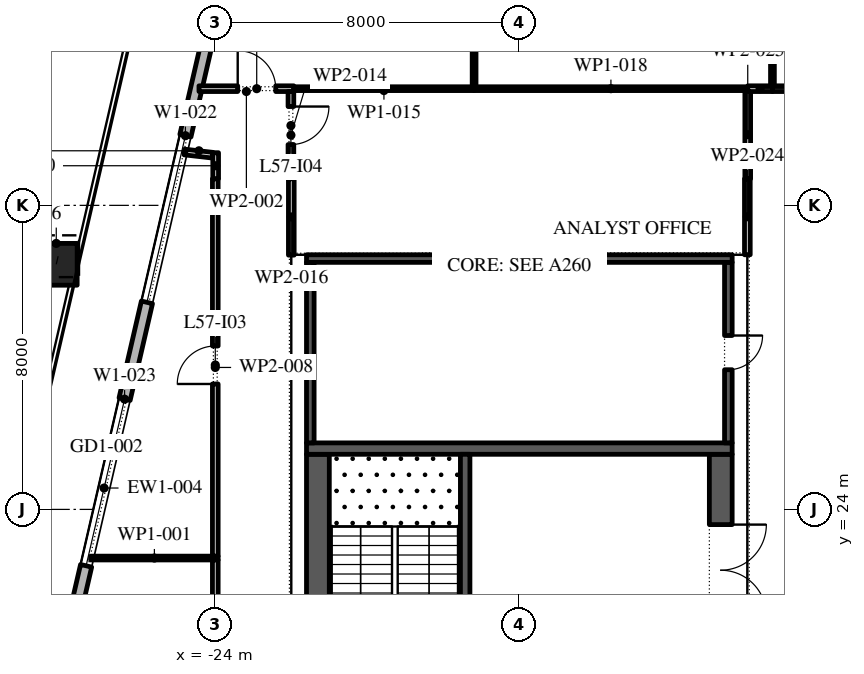
"""IFC4 building model, lengths in metres.
Left out: names, types, materials, properties, quantities, classifications, styles, units other than length and angle.
Written with IfcOpenShell. Run it as: python <this file> out.ifc"""

import sys

from ifc_helpers import new_model, si_unit, direction, frame, frame_2d, origin, origin_2d, place, context, subcontext, project, spatial, rectangle, extrude, element, fill, save


model = new_model("IFC4")
c1 = context("Model", 3, precision=1e-05, world=origin(), true_north=direction((0.0, 1.0)))
c2 = subcontext(c1, "Body", "Model", "MODEL_VIEW")
j1 = project(units=[si_unit("LENGTHUNIT", "METRE"), si_unit("PLANEANGLEUNIT", "RADIAN")], contexts=[c1])
p1 = place(None, origin())
s1 = spatial("IfcSite", under=j1, at=p1, CompositionType="ELEMENT")
p2 = place(p1, origin())
s2 = spatial("IfcBuilding", under=s1, at=p2, CompositionType="ELEMENT")
p3 = place(p2, frame((0.0, 0.0, 264.0)))
s3 = spatial("IfcBuildingStorey", under=s2, at=p3, CompositionType="ELEMENT", Elevation=264.0)
p4 = place(p3, frame((-28.184, 30.449, 0.0), z_axis=(0.011610223917, 0.050562525159, 0.998653410223), x_axis=(-0.974635787342, 0.223796966095, 0.0)))
e1 = element("IfcColumn", 1, at=p4, inside=s3, PredefinedType="COLUMN", context=c2, shape_type="SweptSolid", body=[
    extrude(rectangle(XDim=1.1, YDim=1.1, at=origin_2d()), origin(), (0.0, 0.0, 1.0), 4.206),
])
p5 = place(p3, frame((-21.359, 48.678, 0.0), z_axis=(0.0, 0.0, 1.0), x_axis=(-0.224949198343, -0.974370493275, 0.0)))
e2 = element("IfcWall", 2, at=p5, inside=s3, PredefinedType="STANDARD", context=c2, shape_type="SweptSolid", body=[
    extrude(rectangle(XDim=49.5, YDim=0.3, at=frame_2d((24.75, 0.0))), origin(), (0.0, 0.0, 1.0), 4.0),
])
p6 = place(p5, frame((1.157, 0.0, 0.45)))
e3 = element("IfcOpeningElement", 3, at=p6, cuts=e2, PredefinedType="OPENING", context=c2, shape_type="SweptSolid", body=[
    extrude(rectangle(XDim=4.5, YDim=3.05, at=frame_2d((2.25, 1.525))), frame((0.0, 0.16, 0.0), z_axis=(0.0, -1.0, 0.0), x_axis=(1.0, 0.0, 0.0)), (0.0, 0.0, 1.0), 0.32),
])
p7 = place(p5, frame((9.171, 0.0, 0.0)))
e4 = element("IfcOpeningElement", 4, at=p7, cuts=e2, PredefinedType="OPENING", context=c2, shape_type="SweptSolid", body=[
    extrude(rectangle(XDim=2.4, YDim=3.5, at=frame_2d((1.2, 1.75))), frame((0.0, 0.16, 0.0), z_axis=(0.0, -1.0, 0.0), x_axis=(1.0, 0.0, 0.0)), (0.0, 0.0, 1.0), 0.32),
])
p8 = place(p5, frame((15.236, 0.0, 0.45)))
e5 = element("IfcOpeningElement", 5, at=p8, cuts=e2, PredefinedType="OPENING", context=c2, shape_type="SweptSolid", body=[
    extrude(rectangle(XDim=4.5, YDim=3.05, at=frame_2d((2.25, 1.525))), frame((0.0, 0.16, 0.0), z_axis=(0.0, -1.0, 0.0), x_axis=(1.0, 0.0, 0.0)), (0.0, 0.0, 1.0), 0.32),
])
p9 = place(p5, frame((22.35, 0.0, 0.45)))
e6 = element("IfcOpeningElement", 6, at=p9, cuts=e2, PredefinedType="OPENING", context=c2, shape_type="SweptSolid", body=[
    extrude(rectangle(XDim=4.5, YDim=3.05, at=frame_2d((2.25, 1.525))), frame((0.0, 0.16, 0.0), z_axis=(0.0, -1.0, 0.0), x_axis=(1.0, 0.0, 0.0)), (0.0, 0.0, 1.0), 0.32),
])
p10 = place(p5, frame((29.464, 0.0, 0.45)))
e7 = element("IfcOpeningElement", 7, at=p10, cuts=e2, PredefinedType="OPENING", context=c2, shape_type="SweptSolid", body=[
    extrude(rectangle(XDim=4.5, YDim=3.05, at=frame_2d((2.25, 1.525))), frame((0.0, 0.16, 0.0), z_axis=(0.0, -1.0, 0.0), x_axis=(1.0, 0.0, 0.0)), (0.0, 0.0, 1.0), 0.32),
])
p11 = place(p5, frame((37.628, 0.0, 0.0)))
e8 = element("IfcOpeningElement", 8, at=p11, cuts=e2, PredefinedType="OPENING", context=c2, shape_type="SweptSolid", body=[
    extrude(rectangle(XDim=2.4, YDim=3.325, at=frame_2d((1.2, 1.663))), frame((0.0, 0.16, 0.0), z_axis=(0.0, -1.0, 0.0), x_axis=(1.0, 0.0, 0.0)), (0.0, 0.0, 1.0), 0.32),
])
p12 = place(p5, frame((43.693, 0.0, 0.45)))
e9 = element("IfcOpeningElement", 9, at=p12, cuts=e2, PredefinedType="OPENING", context=c2, shape_type="SweptSolid", body=[
    extrude(rectangle(XDim=4.5, YDim=2.825, at=frame_2d((2.25, 1.413))), frame((0.0, 0.16, 0.0), z_axis=(0.0, -1.0, 0.0), x_axis=(1.0, 0.0, 0.0)), (0.0, 0.0, 1.0), 0.32),
])
p13 = place(p3, frame((-21.3, -2.45, 0.0), z_axis=(0.0, 0.0, 1.0), x_axis=(0.0, 1.0, 0.0)))
e10 = element("IfcWall", 10, at=p13, inside=s3, PredefinedType="SHEAR", context=c2, shape_type="SweptSolid", body=[
    extrude(rectangle(XDim=27.9, YDim=0.6, at=frame_2d((13.95, 0.0))), origin(), (0.0, 0.0, 1.0), 4.0),
])
p14 = place(p13, frame((5.05, 0.0, 0.0)))
e11 = element("IfcOpeningElement", 11, at=p14, cuts=e10, PredefinedType="OPENING", context=c2, shape_type="SweptSolid", body=[
    extrude(rectangle(XDim=1.2, YDim=2.1, at=frame_2d((0.6, 1.05))), frame((0.0, 0.31, 0.0), z_axis=(0.0, -1.0, 0.0), x_axis=(1.0, 0.0, 0.0)), (0.0, 0.0, 1.0), 0.62),
])
p15 = place(p13, frame((21.65, 0.0, 0.0)))
e12 = element("IfcOpeningElement", 12, at=p15, cuts=e10, PredefinedType="OPENING", context=c2, shape_type="SweptSolid", body=[
    extrude(rectangle(XDim=1.2, YDim=2.1, at=frame_2d((0.6, 1.05))), frame((0.0, 0.31, 0.0), z_axis=(0.0, -1.0, 0.0), x_axis=(1.0, 0.0, 0.0)), (0.0, 0.0, 1.0), 0.62),
])
p16 = place(p3, frame((-10.7, -2.45, 0.0), z_axis=(0.0, 0.0, 1.0), x_axis=(0.0, 1.0, 0.0)))
e13 = element("IfcWall", 13, at=p16, inside=s3, PredefinedType="SHEAR", context=c2, shape_type="SweptSolid", body=[
    extrude(rectangle(XDim=27.9, YDim=0.6, at=frame_2d((13.95, 0.0))), origin(), (0.0, 0.0, 1.0), 4.0),
])
p17 = place(p16, frame((23.65, 0.0, 0.0)))
e14 = element("IfcOpeningElement", 14, at=p17, cuts=e13, PredefinedType="OPENING", context=c2, shape_type="SweptSolid", body=[
    extrude(rectangle(XDim=2.4, YDim=2.1, at=frame_2d((1.2, 1.05))), frame((0.0, 0.31, 0.0), z_axis=(0.0, -1.0, 0.0), x_axis=(1.0, 0.0, 0.0)), (0.0, 0.0, 1.0), 0.62),
])
p18 = place(p16, frame((0.788, 0.0, 0.0)))
e15 = element("IfcOpeningElement", 15, at=p18, cuts=e13, PredefinedType="OPENING", context=c2, shape_type="SweptSolid", body=[
    extrude(rectangle(XDim=0.9, YDim=2.1, at=frame_2d((0.45, 1.05))), frame((0.0, 0.31, 0.0), z_axis=(0.0, -1.0, 0.0), x_axis=(1.0, 0.0, 0.0)), (0.0, 0.0, 1.0), 0.62),
])
p19 = place(p16, frame((3.962, 0.0, 0.0)))
e16 = element("IfcOpeningElement", 16, at=p19, cuts=e13, PredefinedType="OPENING", context=c2, shape_type="SweptSolid", body=[
    extrude(rectangle(XDim=1.0, YDim=2.1, at=frame_2d((0.5, 1.05))), frame((0.0, 0.31, 0.0), z_axis=(0.0, -1.0, 0.0), x_axis=(1.0, 0.0, 0.0)), (0.0, 0.0, 1.0), 0.62),
])
p20 = place(p3, frame((-21.6, 25.6, 0.0), z_axis=(0.0, 0.0, 1.0), x_axis=(1.0, 0.0, 0.0)))
e17 = element("IfcWall", 17, at=p20, inside=s3, PredefinedType="SHEAR", context=c2, shape_type="SweptSolid", body=[
    extrude(rectangle(XDim=11.2, YDim=0.3, at=frame_2d((5.6, 0.0))), origin(), (0.0, 0.0, 1.0), 4.0),
])
p21 = place(p3, frame((-17.425, 19.15, 0.0), z_axis=(0.0, 0.0, 1.0), x_axis=(0.0, 1.0, 0.0)))
e18 = element("IfcWall", 18, at=p21, inside=s3, PredefinedType="SHEAR", context=c2, shape_type="SweptSolid", body=[
    extrude(rectangle(XDim=6.3, YDim=0.25, at=frame_2d((3.15, 0.0))), origin(), (0.0, 0.0, 1.0), 4.0),
])
p22 = place(p21, frame((0.05, 0.0, 0.0)))
e19 = element("IfcOpeningElement", 19, at=p22, cuts=e18, PredefinedType="OPENING", context=c2, shape_type="SweptSolid", body=[
    extrude(rectangle(XDim=1.2, YDim=2.1, at=frame_2d((0.6, 1.05))), frame((0.0, 0.135, 0.0), z_axis=(0.0, -1.0, 0.0), x_axis=(1.0, 0.0, 0.0)), (0.0, 0.0, 1.0), 0.27),
])
p23 = place(p3, frame((-21.5, 25.75, 0.0), z_axis=(0.0, 0.0, 1.0), x_axis=(0.0, 1.0, 0.0)))
e20 = element("IfcWall", 20, at=p23, inside=s3, PredefinedType="SHEAR", context=c2, shape_type="SweptSolid", body=[
    extrude(rectangle(XDim=4.75, YDim=0.2, at=frame_2d((2.375, 0.0))), origin(), (0.0, 0.0, 1.0), 4.0),
])
p24 = place(p3, frame((-10.5, 25.75, 0.0), z_axis=(0.0, 0.0, 1.0), x_axis=(0.0, 1.0, 0.0)))
e21 = element("IfcWall", 21, at=p24, inside=s3, PredefinedType="SHEAR", context=c2, shape_type="SweptSolid", body=[
    extrude(rectangle(XDim=4.75, YDim=0.2, at=frame_2d((2.375, 0.0))), origin(), (0.0, 0.0, 1.0), 4.0),
])
p25 = place(p24, frame((1.925, 0.0, 0.0)))
e22 = element("IfcOpeningElement", 22, at=p25, cuts=e21, PredefinedType="OPENING", context=c2, shape_type="SweptSolid", body=[
    extrude(rectangle(XDim=0.9, YDim=2.1, at=frame_2d((0.45, 1.05))), frame((0.0, 0.11, 0.0), z_axis=(0.0, -1.0, 0.0), x_axis=(1.0, 0.0, 0.0)), (0.0, 0.0, 1.0), 0.22),
])
p26 = place(p3, frame((-21.6, 30.6, 0.0), z_axis=(0.0, 0.0, 1.0), x_axis=(1.0, 0.0, 0.0)))
e23 = element("IfcWall", 23, at=p26, inside=s3, PredefinedType="SHEAR", context=c2, shape_type="SweptSolid", body=[
    extrude(rectangle(XDim=11.2, YDim=0.2, at=frame_2d((5.6, 0.0))), origin(), (0.0, 0.0, 1.0), 4.0),
])
p27 = place(p3, frame((-27.28, 22.72, 0.0), z_axis=(0.0, 0.0, 1.0), x_axis=(1.0, 0.0, 0.0)))
e24 = element("IfcWall", 24, at=p27, inside=s3, PredefinedType="PARTITIONING", context=c2, shape_type="SweptSolid", body=[
    extrude(rectangle(XDim=3.355, YDim=0.1, at=frame_2d((1.677, 0.0))), origin(), (0.0, 0.0, 1.0), 4.0),
])
p28 = place(p3, frame((-24.429, 35.07, 0.0), z_axis=(0.0, 0.0, 1.0), x_axis=(1.0, 0.0, 0.0)))
e25 = element("IfcWall", 25, at=p28, inside=s3, PredefinedType="PARTITIONING", context=c2, shape_type="SweptSolid", body=[
    extrude(rectangle(XDim=2.494, YDim=0.15, at=frame_2d((1.247, 0.0))), origin(), (0.0, 0.0, 1.0), 4.0),
])
p29 = place(p28, frame((1.019, 0.0, 0.0)))
e26 = element("IfcOpeningElement", 26, at=p29, cuts=e25, PredefinedType="OPENING", context=c2, shape_type="SweptSolid", body=[
    extrude(rectangle(XDim=1.0, YDim=2.1, at=frame_2d((0.5, 1.05))), frame((0.0, 0.085, 0.0), z_axis=(0.0, -1.0, 0.0), x_axis=(1.0, 0.0, 0.0)), (0.0, 0.0, 1.0), 0.17),
])
p30 = place(p3, frame((-24.0, 8.86, 0.0), z_axis=(0.0, 0.0, 1.0), x_axis=(0.0, 1.0, 0.0)))
e27 = element("IfcWall", 27, at=p30, inside=s3, PredefinedType="PARTITIONING", context=c2, shape_type="SweptSolid", body=[
    extrude(rectangle(XDim=13.81, YDim=0.15, at=frame_2d((6.905, 0.0))), origin(), (0.0, 0.0, 1.0), 4.0),
])
p31 = place(p30, frame((4.96, 0.0, 0.0)))
e28 = element("IfcOpeningElement", 28, at=p31, cuts=e27, PredefinedType="OPENING", context=c2, shape_type="SweptSolid", body=[
    extrude(rectangle(XDim=1.0, YDim=2.1, at=frame_2d((0.5, 1.05))), frame((0.0, 0.085, 0.0), z_axis=(0.0, -1.0, 0.0), x_axis=(1.0, 0.0, 0.0)), (0.0, 0.0, 1.0), 0.17),
])
p32 = place(p3, frame((-24.0, 22.77, 0.0), z_axis=(0.0, 0.0, 1.0), x_axis=(0.0, 1.0, 0.0)))
e29 = element("IfcWall", 29, at=p32, inside=s3, PredefinedType="PARTITIONING", context=c2, shape_type="SweptSolid", body=[
    extrude(rectangle(XDim=9.93, YDim=0.15, at=frame_2d((4.965, 0.0))), origin(), (0.0, 0.0, 1.0), 4.0),
])
p33 = place(p32, frame((4.53, 0.0, 0.0)))
e30 = element("IfcOpeningElement", 30, at=p33, cuts=e29, PredefinedType="OPENING", context=c2, shape_type="SweptSolid", body=[
    extrude(rectangle(XDim=1.0, YDim=2.1, at=frame_2d((0.5, 1.05))), frame((0.0, 0.085, 0.0), z_axis=(0.0, -1.0, 0.0), x_axis=(1.0, 0.0, 0.0)), (0.0, 0.0, 1.0), 0.17),
])
p34 = place(p3, frame((-23.99, 32.7, 0.0), z_axis=(0.0, 0.0, 1.0), x_axis=(0.0, 1.0, 0.0)))
e31 = element("IfcWall", 31, at=p34, inside=s3, PredefinedType="PARTITIONING", context=c2, shape_type="SweptSolid", body=[
    extrude(rectangle(XDim=0.685, YDim=0.15, at=frame_2d((0.343, 0.0))), origin(), (0.0, 0.0, 1.0), 4.0),
])
p35 = place(p3, frame((-24.065, 33.319, 0.0), z_axis=(0.0, 0.0, 1.0), x_axis=(-0.993611867789, 0.112851478456, 0.0)))
e32 = element("IfcWall", 32, at=p35, inside=s3, PredefinedType="PARTITIONING", context=c2, shape_type="SweptSolid", body=[
    extrude(rectangle(XDim=0.753, YDim=0.15, at=frame_2d((0.376, 0.0))), origin(), (0.0, 0.0, 1.0), 4.0),
])
p36 = place(p3, frame((-22.01, 34.995, 0.0), z_axis=(0.0, 0.0, 1.0), x_axis=(0.0, -1.0, 0.0)))
e33 = element("IfcWall", 33, at=p36, inside=s3, PredefinedType="PARTITIONING", context=c2, shape_type="SweptSolid", body=[
    extrude(rectangle(XDim=2.295, YDim=0.15, at=frame_2d((1.147, 0.0))), origin(), (0.0, 0.0, 1.0), 4.0),
])
p37 = place(p36, frame((0.395, 0.0, 0.0)))
e34 = element("IfcOpeningElement", 34, at=p37, cuts=e33, PredefinedType="OPENING", context=c2, shape_type="SweptSolid", body=[
    extrude(rectangle(XDim=1.0, YDim=2.1, at=frame_2d((0.5, 1.05))), frame((0.0, 0.085, 0.0), z_axis=(0.0, -1.0, 0.0), x_axis=(1.0, 0.0, 0.0)), (0.0, 0.0, 1.0), 0.17),
])
p38 = place(p3, frame((-21.935, 35.07, 0.0), z_axis=(0.0, 0.0, 1.0), x_axis=(1.0, 0.0, 0.0)))
e35 = element("IfcWall", 35, at=p38, inside=s3, PredefinedType="PARTITIONING", context=c2, shape_type="SweptSolid", body=[
    extrude(rectangle(XDim=4.745, YDim=0.1, at=frame_2d((2.373, 0.0))), origin(), (0.0, 0.0, 1.0), 4.0),
])
p39 = place(p3, frame((-22.0, 32.7, 0.0), z_axis=(0.0, 0.0, 1.0), x_axis=(0.0, -1.0, 0.0)))
e36 = element("IfcWall", 36, at=p39, inside=s3, PredefinedType="PARTITIONING", context=c2, shape_type="SweptSolid", body=[
    extrude(rectangle(XDim=2.01, YDim=0.15, at=frame_2d((1.005, 0.0))), origin(), (0.0, 0.0, 1.0), 4.0),
])
p40 = place(p3, frame((-17.19, 35.12, 0.0), z_axis=(0.0, 0.0, 1.0), x_axis=(0.0, 1.0, 0.0)))
e37 = element("IfcWall", 37, at=p40, inside=s3, PredefinedType="PARTITIONING", context=c2, shape_type="SweptSolid", body=[
    extrude(rectangle(XDim=6.83, YDim=0.1, at=frame_2d((3.415, 0.0))), origin(), (0.0, 0.0, 1.0), 4.0),
])
p41 = place(p3, frame((-17.19, 35.07, 0.0), z_axis=(0.0, 0.0, 1.0), x_axis=(1.0, 0.0, 0.0)))
e38 = element("IfcWall", 38, at=p41, inside=s3, PredefinedType="PARTITIONING", context=c2, shape_type="SweptSolid", body=[
    extrude(rectangle(XDim=7.2, YDim=0.1, at=frame_2d((3.6, 0.0))), origin(), (0.0, 0.0, 1.0), 4.0),
])
p42 = place(p3, frame((-10.0, 30.7, 0.0), z_axis=(0.0, 0.0, 1.0), x_axis=(0.0, 1.0, 0.0)))
e39 = element("IfcWall", 39, at=p42, inside=s3, PredefinedType="PARTITIONING", context=c2, shape_type="SweptSolid", body=[
    extrude(rectangle(XDim=2.0, YDim=0.15, at=frame_2d((1.0, 0.0))), origin(), (0.0, 0.0, 1.0), 4.0),
])
p43 = place(p3, frame((-9.99, 32.7, 0.0), z_axis=(0.0, 0.0, 1.0), x_axis=(0.0, 1.0, 0.0)))
e40 = element("IfcWall", 40, at=p43, inside=s3, PredefinedType="PARTITIONING", context=c2, shape_type="SweptSolid", body=[
    extrude(rectangle(XDim=2.32, YDim=0.15, at=frame_2d((1.16, 0.0))), origin(), (0.0, 0.0, 1.0), 4.0),
])
p44 = place(p3, frame((-9.99, 35.07, 0.0), z_axis=(0.0, 0.0, 1.0), x_axis=(1.0, 0.0, 0.0)))
e41 = element("IfcWall", 41, at=p44, inside=s3, PredefinedType="PARTITIONING", context=c2, shape_type="SweptSolid", body=[
    extrude(rectangle(XDim=0.65, YDim=0.15, at=frame_2d((0.325, 0.0))), origin(), (0.0, 0.0, 1.0), 4.0),
])
p45 = place(p3, frame((-9.34, 35.145, 0.0), z_axis=(0.0, 0.0, 1.0), x_axis=(0.0, 1.0, 0.0)))
e42 = element("IfcWall", 42, at=p45, inside=s3, PredefinedType="PARTITIONING", context=c2, shape_type="SweptSolid", body=[
    extrude(rectangle(XDim=8.405, YDim=0.1, at=frame_2d((4.203, 0.0))), origin(), (0.0, 0.0, 1.0), 4.0),
])
p46 = place(p45, frame((4.505, 0.0, 0.0)))
e43 = element("IfcOpeningElement", 43, at=p46, cuts=e42, PredefinedType="OPENING", context=c2, shape_type="SweptSolid", body=[
    extrude(rectangle(XDim=0.9, YDim=2.1, at=frame_2d((0.45, 1.05))), frame((0.0, 0.06, 0.0), z_axis=(0.0, -1.0, 0.0), x_axis=(1.0, 0.0, 0.0)), (0.0, 0.0, 1.0), 0.12),
])
p47 = place(p3, frame((-9.34, 35.07, 0.0), z_axis=(0.0, 0.0, 1.0), x_axis=(1.0, 0.0, 0.0)))
e44 = element("IfcWall", 44, at=p47, inside=s3, PredefinedType="PARTITIONING", context=c2, shape_type="SweptSolid", body=[
    extrude(rectangle(XDim=1.405, YDim=0.15, at=frame_2d((0.703, 0.0))), origin(), (0.0, 0.0, 1.0), 4.0),
])
p48 = place(p8, origin())
e45 = element("IfcWindow", 45, at=p48, inside=s3, PartitioningType="DOUBLE_PANEL_VERTICAL", PredefinedType="WINDOW", context=c2, shape_type="SweptSolid", body=[
    extrude(rectangle(XDim=4.5, YDim=3.05, at=frame_2d((2.25, 1.525))), frame((0.0, 0.03, 0.0), z_axis=(0.0, -1.0, 0.0), x_axis=(1.0, 0.0, 0.0)), (0.0, 0.0, 1.0), 0.06),
])
fill(e5, e45)
p49 = place(p9, origin())
e46 = element("IfcWindow", 46, at=p49, inside=s3, PartitioningType="DOUBLE_PANEL_VERTICAL", PredefinedType="WINDOW", context=c2, shape_type="SweptSolid", body=[
    extrude(rectangle(XDim=4.5, YDim=3.05, at=frame_2d((2.25, 1.525))), frame((0.0, 0.03, 0.0), z_axis=(0.0, -1.0, 0.0), x_axis=(1.0, 0.0, 0.0)), (0.0, 0.0, 1.0), 0.06),
])
fill(e6, e46)
p50 = place(p17, frame((2.4, 0.0, 0.0), z_axis=(0.0, 0.0, 1.0), x_axis=(-1.0, 0.0, 0.0)))
e47 = element("IfcDoor", 47, at=p50, inside=s3, OperationType="DOUBLE_DOOR_SINGLE_SWING", PredefinedType="DOOR", context=c2, shape_type="SweptSolid", body=[
    extrude(rectangle(XDim=2.4, YDim=2.1, at=frame_2d((1.2, 1.05))), frame((0.0, 0.025, 0.0), z_axis=(0.0, -1.0, 0.0), x_axis=(1.0, 0.0, 0.0)), (0.0, 0.0, 1.0), 0.05),
])
fill(e14, e47)
p51 = place(p25, frame((0.9, 0.15, 0.0), z_axis=(0.0, 0.0, 1.0), x_axis=(-1.0, 0.0, 0.0)))
e48 = element("IfcDoor", 48, at=p51, inside=s3, OperationType="SINGLE_SWING_RIGHT", PredefinedType="DOOR", context=c2, shape_type="SweptSolid", body=[
    extrude(rectangle(XDim=0.9, YDim=2.1, at=frame_2d((0.45, 1.05))), frame((0.0, 0.1, 0.0), z_axis=(0.0, -1.0, 0.0), x_axis=(1.0, 0.0, 0.0)), (0.0, 0.0, 1.0), 0.05),
])
fill(e22, e48)
p52 = place(p33, origin())
e49 = element("IfcDoor", 49, at=p52, inside=s3, OperationType="SINGLE_SWING_RIGHT", PredefinedType="DOOR", context=c2, shape_type="SweptSolid", body=[
    extrude(rectangle(XDim=1.0, YDim=2.1, at=frame_2d((0.5, 1.05))), frame((0.0, 0.025, 0.0), z_axis=(0.0, -1.0, 0.0), x_axis=(1.0, 0.0, 0.0)), (0.0, 0.0, 1.0), 0.05),
])
fill(e30, e49)
p53 = place(p37, origin())
e50 = element("IfcDoor", 50, at=p53, inside=s3, OperationType="SINGLE_SWING_RIGHT", PredefinedType="DOOR", context=c2, shape_type="SweptSolid", body=[
    extrude(rectangle(XDim=1.0, YDim=2.1, at=frame_2d((0.5, 1.05))), frame((0.0, 0.025, 0.0), z_axis=(0.0, -1.0, 0.0), x_axis=(1.0, 0.0, 0.0)), (0.0, 0.0, 1.0), 0.05),
])
fill(e34, e50)
p54 = place(p29, origin())
e51 = element("IfcDoor", 51, at=p54, inside=s3, OperationType="SINGLE_SWING_RIGHT", PredefinedType="DOOR", context=c2, shape_type="SweptSolid", body=[
    extrude(rectangle(XDim=1.0, YDim=2.1, at=frame_2d((0.5, 1.05))), frame((0.0, 0.025, 0.0), z_axis=(0.0, -1.0, 0.0), x_axis=(1.0, 0.0, 0.0)), (0.0, 0.0, 1.0), 0.05),
])
fill(e26, e51)
save(model, sys.argv[1])
